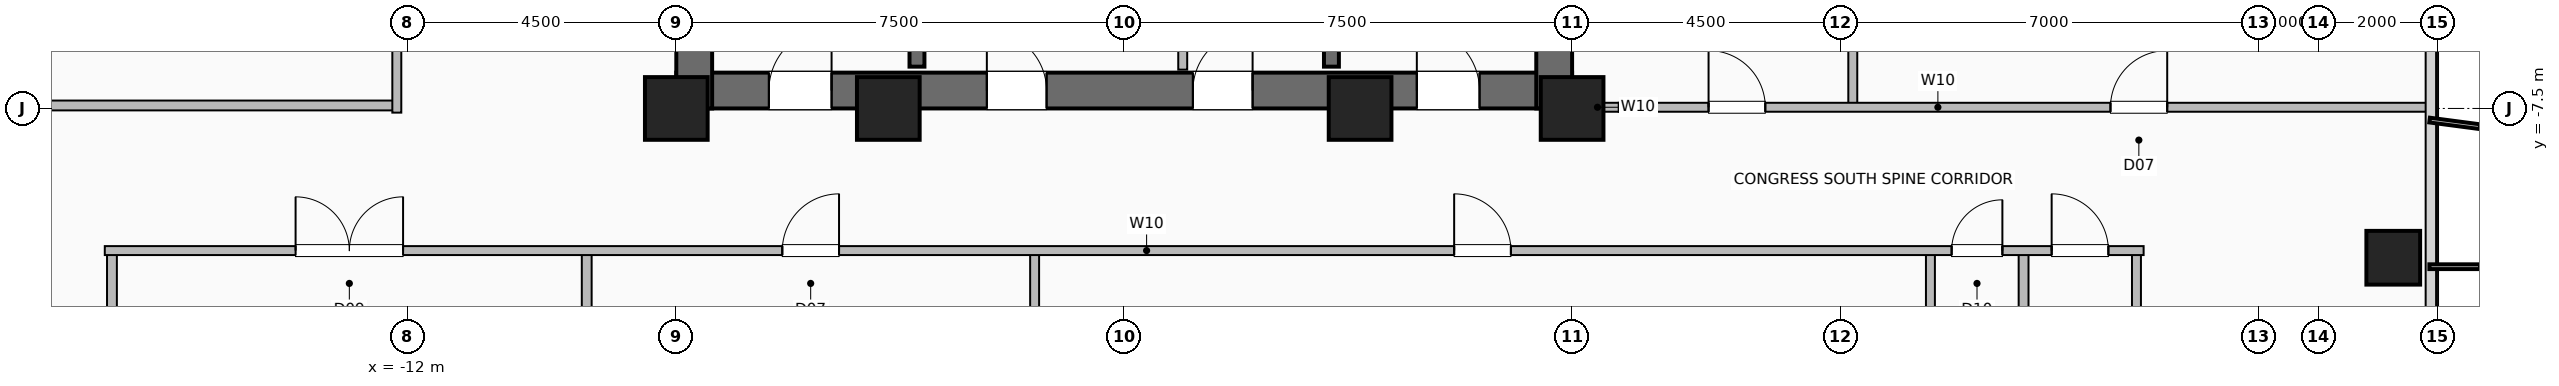
"""IFC4 building model, lengths in metres.
Left out: names, types, materials, properties, quantities, classifications, styles, units other than length and angle.
Written with IfcOpenShell. Run it as: python <this file> out.ifc"""

import sys

from ifc_helpers import new_model, si_unit, direction, frame, frame_2d, origin, origin_2d, place, context, subcontext, project, spatial, rectangle, hollow_rectangle, extrude, element, fill, save


model = new_model("IFC4")
c1 = context("Model", 3, precision=1e-05, world=origin(), true_north=direction((0.0, 1.0)))
c2 = subcontext(c1, "Body", "Model", "MODEL_VIEW")
j1 = project(units=[si_unit("LENGTHUNIT", "METRE"), si_unit("PLANEANGLEUNIT", "RADIAN")], contexts=[c1])
p1 = place(None, origin())
s1 = spatial("IfcSite", under=j1, at=p1, CompositionType="ELEMENT")
p2 = place(p1, origin())
s2 = spatial("IfcBuilding", under=s1, at=p2, CompositionType="ELEMENT")
p3 = place(p2, frame((0.0, 0.0, 104.8)))
s3 = spatial("IfcBuildingStorey", under=s2, at=p3, CompositionType="ELEMENT", Elevation=104.8)
for number, where, z_axis, x_axis in (
    (1, (-7.5, -7.5, 0.0), (0.0, 0.0, 1.0), (1.0, 0.0, 0.0)),
    (2, (-3.95, -7.5, 0.0), (0.0, 0.0, 1.0), (1.0, 0.0, 0.0)),
    (3, (3.95, -7.5, 0.0), (0.0, 0.0, 1.0), (1.0, 0.0, 0.0)),
    (4, (7.5, -7.5, 0.0), (0.0, 0.0, 1.0), (1.0, 0.0, 0.0)),
):
    element("IfcColumn", number, at=place(p3, frame(where, z_axis=z_axis, x_axis=x_axis)), inside=s3, PredefinedType="COLUMN", context=c2, shape_type="SweptSolid", body=[
        extrude(hollow_rectangle(XDim=1.05, YDim=1.05, WallThickness=0.05, at=origin_2d()), origin(), (0.0, 0.0, 1.0), 3.6),
    ])
p4 = place(p3, frame((21.25, -10.0, 0.0), z_axis=(0.0, 0.0, 1.0), x_axis=(1.0, 0.0, 0.0)))
e5 = element("IfcColumn", 5, at=p4, inside=s3, PredefinedType="COLUMN", context=c2, shape_type="SweptSolid", body=[
    extrude(hollow_rectangle(XDim=0.9, YDim=0.9, WallThickness=0.045, at=origin_2d()), origin(), (0.0, 0.0, 1.0), 3.6),
])
p5 = place(p3, frame((-7.5, -7.2, 0.0), z_axis=(0.0, 0.0, 1.0), x_axis=(1.0, 0.0, 0.0)))
e6 = element("IfcWall", 6, at=p5, inside=s3, PredefinedType="SHEAR", context=c2, shape_type="SweptSolid", body=[
    extrude(rectangle(XDim=15.0, YDim=0.6, at=frame_2d((7.5, 0.0))), origin(), (0.0, 0.0, 1.0), 3.36),
])
p6 = place(p5, frame((1.55, 0.0, 0.0)))
e7 = element("IfcOpeningElement", 7, at=p6, cuts=e6, PredefinedType="OPENING", context=c2, shape_type="SweptSolid", body=[
    extrude(rectangle(XDim=1.05, YDim=2.08, at=frame_2d((0.525, 1.04))), frame((0.0, 0.31, 0.0), z_axis=(0.0, -1.0, 0.0), x_axis=(1.0, 0.0, 0.0)), (0.0, 0.0, 1.0), 0.62),
])
p7 = place(p5, frame((12.4, 0.0, 0.0)))
e8 = element("IfcOpeningElement", 8, at=p7, cuts=e6, PredefinedType="OPENING", context=c2, shape_type="SweptSolid", body=[
    extrude(rectangle(XDim=1.05, YDim=2.08, at=frame_2d((0.525, 1.04))), frame((0.0, 0.31, 0.0), z_axis=(0.0, -1.0, 0.0), x_axis=(1.0, 0.0, 0.0)), (0.0, 0.0, 1.0), 0.62),
])
p8 = place(p5, frame((5.2, 0.0, 0.0)))
e9 = element("IfcOpeningElement", 9, at=p8, cuts=e6, PredefinedType="OPENING", context=c2, shape_type="SweptSolid", body=[
    extrude(rectangle(XDim=1.0, YDim=2.08, at=frame_2d((0.5, 1.04))), frame((0.0, 0.31, 0.0), z_axis=(0.0, -1.0, 0.0), x_axis=(1.0, 0.0, 0.0)), (0.0, 0.0, 1.0), 0.62),
])
p9 = place(p5, frame((8.65, 0.0, 0.0)))
e10 = element("IfcOpeningElement", 10, at=p9, cuts=e6, PredefinedType="OPENING", context=c2, shape_type="SweptSolid", body=[
    extrude(rectangle(XDim=1.0, YDim=2.08, at=frame_2d((0.5, 1.04))), frame((0.0, 0.31, 0.0), z_axis=(0.0, -1.0, 0.0), x_axis=(1.0, 0.0, 0.0)), (0.0, 0.0, 1.0), 0.62),
])
p10 = place(p3, frame((-7.2, -7.5, 0.0), z_axis=(0.0, 0.0, 1.0), x_axis=(0.0, 1.0, 0.0)))
e11 = element("IfcWall", 11, at=p10, inside=s3, PredefinedType="SHEAR", context=c2, shape_type="SweptSolid", body=[
    extrude(rectangle(XDim=15.0, YDim=0.6, at=frame_2d((7.5, 0.0))), origin(), (0.0, 0.0, 1.0), 3.36),
])
p11 = place(p10, frame((9.5, 0.0, 0.0)))
e12 = element("IfcOpeningElement", 12, at=p11, cuts=e11, PredefinedType="OPENING", context=c2, shape_type="SweptSolid", body=[
    extrude(rectangle(XDim=1.0, YDim=2.08, at=frame_2d((0.5, 1.04))), frame((0.0, 0.31, 0.0), z_axis=(0.0, -1.0, 0.0), x_axis=(1.0, 0.0, 0.0)), (0.0, 0.0, 1.0), 0.62),
])
p12 = place(p3, frame((7.2, -7.5, 0.0), z_axis=(0.0, 0.0, 1.0), x_axis=(0.0, 1.0, 0.0)))
e13 = element("IfcWall", 13, at=p12, inside=s3, PredefinedType="SHEAR", context=c2, shape_type="SweptSolid", body=[
    extrude(rectangle(XDim=15.0, YDim=0.6, at=frame_2d((7.5, 0.0))), origin(), (0.0, 0.0, 1.0), 3.36),
])
for number, where, z_axis, x_axis in (
    (14, (-3.47, -6.8, 0.0), (0.0, 0.0, 1.0), (0.0, 1.0, 0.0)),
    (15, (3.47, -6.8, 0.0), (0.0, 0.0, 1.0), (0.0, 1.0, 0.0)),
):
    element("IfcWall", number, at=place(p3, frame(where, z_axis=z_axis, x_axis=x_axis)), inside=s3, PredefinedType="SHEAR", context=c2, shape_type="SweptSolid", body=[
        extrude(rectangle(XDim=7.72, YDim=0.25, at=frame_2d((3.86, 0.0))), origin(), (0.0, 0.0, 1.0), 3.36),
    ])
p13 = place(p3, frame((0.98, -6.85, 0.0), z_axis=(0.0, 0.0, 1.0), x_axis=(0.0, 1.0, 0.0)))
e16 = element("IfcWall", 16, at=p13, inside=s3, PredefinedType="PARTITIONING", context=c2, shape_type="SweptSolid", body=[
    extrude(rectangle(XDim=4.42, YDim=0.15, at=frame_2d((2.21, 0.0))), origin(), (0.0, 0.0, 1.0), 3.36),
])
for number, where, z_axis, x_axis in (
    (17, (15.06, -21.82, 0.0), (0.0, 0.0, 1.0), (0.0, 1.0, 0.0)),
    (18, (-16.95, -21.82, 0.0), (0.0, 0.0, 1.0), (0.0, 1.0, 0.0)),
    (19, (-9.0, -21.82, 0.0), (0.0, 0.0, 1.0), (0.0, 1.0, 0.0)),
):
    element("IfcWall", number, at=place(p3, frame(where, z_axis=z_axis, x_axis=x_axis)), inside=s3, PredefinedType="PLUMBINGWALL", context=c2, shape_type="SweptSolid", body=[
        extrude(rectangle(XDim=11.94, YDim=0.165, at=frame_2d((5.97, 0.0))), origin(), (0.0, 0.0, 1.0), 3.36),
    ])
for number, where, z_axis, x_axis in (
    (20, (-1.5, -21.82, 0.0), (0.0, 0.0, 1.0), (0.0, 1.0, 0.0)),
    (21, (13.5, -21.82, 0.0), (0.0, 0.0, 1.0), (0.0, 1.0, 0.0)),
    (22, (16.95, -21.82, 0.0), (0.0, 0.0, 1.0), (0.0, 1.0, 0.0)),
):
    element("IfcWall", number, at=place(p3, frame(where, z_axis=z_axis, x_axis=x_axis)), inside=s3, PredefinedType="PARTITIONING", context=c2, shape_type="SweptSolid", body=[
        extrude(rectangle(XDim=11.94, YDim=0.15, at=frame_2d((5.97, 0.0))), origin(), (0.0, 0.0, 1.0), 3.36),
    ])
p14 = place(p3, frame((-17.07, -9.88, 0.0), z_axis=(0.0, 0.0, 1.0), x_axis=(1.0, 0.0, 0.0)))
e23 = element("IfcWall", 23, at=p14, inside=s3, PredefinedType="PARTITIONING", context=c2, shape_type="SweptSolid", body=[
    extrude(rectangle(XDim=34.14, YDim=0.15, at=frame_2d((17.07, 0.0))), origin(), (0.0, 0.0, 1.0), 3.36),
])
p15 = place(p14, frame((3.195, 0.0, 0.0)))
e24 = element("IfcOpeningElement", 24, at=p15, cuts=e23, PredefinedType="OPENING", context=c2, shape_type="SweptSolid", body=[
    extrude(rectangle(XDim=1.8, YDim=2.08, at=frame_2d((0.9, 1.04))), frame((0.0, 0.085, 0.0), z_axis=(0.0, -1.0, 0.0), x_axis=(1.0, 0.0, 0.0)), (0.0, 0.0, 1.0), 0.17),
])
p16 = place(p14, frame((11.345, 0.0, 0.0)))
e25 = element("IfcOpeningElement", 25, at=p16, cuts=e23, PredefinedType="OPENING", context=c2, shape_type="SweptSolid", body=[
    extrude(rectangle(XDim=0.95, YDim=2.06, at=frame_2d((0.475, 1.03))), frame((0.0, 0.085, 0.0), z_axis=(0.0, -1.0, 0.0), x_axis=(1.0, 0.0, 0.0)), (0.0, 0.0, 1.0), 0.17),
])
p17 = place(p14, frame((22.595, 0.0, 0.0)))
e26 = element("IfcOpeningElement", 26, at=p17, cuts=e23, PredefinedType="OPENING", context=c2, shape_type="SweptSolid", body=[
    extrude(rectangle(XDim=0.95, YDim=2.06, at=frame_2d((0.475, 1.03))), frame((0.0, 0.085, 0.0), z_axis=(0.0, -1.0, 0.0), x_axis=(1.0, 0.0, 0.0)), (0.0, 0.0, 1.0), 0.17),
])
p18 = place(p14, frame((30.925, 0.0, 0.0)))
e27 = element("IfcOpeningElement", 27, at=p18, cuts=e23, PredefinedType="OPENING", context=c2, shape_type="SweptSolid", body=[
    extrude(rectangle(XDim=0.85, YDim=2.05, at=frame_2d((0.425, 1.025))), frame((0.0, 0.085, 0.0), z_axis=(0.0, -1.0, 0.0), x_axis=(1.0, 0.0, 0.0)), (0.0, 0.0, 1.0), 0.17),
])
p19 = place(p14, frame((32.6, 0.0, 0.0)))
e28 = element("IfcOpeningElement", 28, at=p19, cuts=e23, PredefinedType="OPENING", context=c2, shape_type="SweptSolid", body=[
    extrude(rectangle(XDim=0.95, YDim=2.06, at=frame_2d((0.475, 1.03))), frame((0.0, 0.085, 0.0), z_axis=(0.0, -1.0, 0.0), x_axis=(1.0, 0.0, 0.0)), (0.0, 0.0, 1.0), 0.17),
])
p20 = place(p3, frame((-21.82, -7.45, 0.0), z_axis=(0.0, 0.0, 1.0), x_axis=(1.0, 0.0, 0.0)))
e29 = element("IfcWall", 29, at=p20, inside=s3, PredefinedType="PLUMBINGWALL", context=c2, shape_type="SweptSolid", body=[
    extrude(rectangle(XDim=9.64, YDim=0.165, at=frame_2d((4.82, 0.0))), origin(), (0.0, 0.0, 1.0), 3.36),
])
p21 = place(p3, frame((-12.18, -7.57, 0.0), z_axis=(0.0, 0.0, 1.0), x_axis=(0.0, 1.0, 0.0)))
e30 = element("IfcWall", 30, at=p21, inside=s3, PredefinedType="PARTITIONING", context=c2, shape_type="SweptSolid", body=[
    extrude(rectangle(XDim=15.14, YDim=0.15, at=frame_2d((7.57, 0.0))), origin(), (0.0, 0.0, 1.0), 3.36),
])
p22 = place(p21, frame((2.62, 0.0, 0.0)))
e31 = element("IfcOpeningElement", 31, at=p22, cuts=e30, PredefinedType="OPENING", context=c2, shape_type="SweptSolid", body=[
    extrude(rectangle(XDim=0.95, YDim=2.06, at=frame_2d((0.475, 1.03))), frame((0.0, 0.085, 0.0), z_axis=(0.0, -1.0, 0.0), x_axis=(1.0, 0.0, 0.0)), (0.0, 0.0, 1.0), 0.17),
])
p23 = place(p21, frame((8.845, 0.0, 0.0)))
e32 = element("IfcOpeningElement", 32, at=p23, cuts=e30, PredefinedType="OPENING", context=c2, shape_type="SweptSolid", body=[
    extrude(rectangle(XDim=0.95, YDim=2.06, at=frame_2d((0.475, 1.03))), frame((0.0, 0.085, 0.0), z_axis=(0.0, -1.0, 0.0), x_axis=(1.0, 0.0, 0.0)), (0.0, 0.0, 1.0), 0.17),
])
p24 = place(p21, frame((13.37, 0.0, 0.0)))
e33 = element("IfcOpeningElement", 33, at=p24, cuts=e30, PredefinedType="OPENING", context=c2, shape_type="SweptSolid", body=[
    extrude(rectangle(XDim=0.85, YDim=2.05, at=frame_2d((0.425, 1.025))), frame((0.0, 0.085, 0.0), z_axis=(0.0, -1.0, 0.0), x_axis=(1.0, 0.0, 0.0)), (0.0, 0.0, 1.0), 0.17),
])
p25 = place(p3, frame((7.45, -7.48, 0.0), z_axis=(0.0, 0.0, 1.0), x_axis=(1.0, 0.0, 0.0)))
e34 = element("IfcWall", 34, at=p25, inside=s3, PredefinedType="PARTITIONING", context=c2, shape_type="SweptSolid", body=[
    extrude(rectangle(XDim=0.95, YDim=0.15, at=frame_2d((0.475, 0.0))), origin(), (0.0, 0.0, 1.0), 3.36),
])
p26 = place(p3, frame((12.2, -7.48, 0.0), z_axis=(0.0, 0.0, 1.0), x_axis=(0.0, 1.0, 0.0)))
e35 = element("IfcWall", 35, at=p26, inside=s3, PredefinedType="PARTITIONING", context=c2, shape_type="SweptSolid", body=[
    extrude(rectangle(XDim=14.88, YDim=0.15, at=frame_2d((7.44, 0.0))), origin(), (0.0, 0.0, 1.0), 3.36),
])
p27 = place(p3, frame((8.28, -7.48, 0.0), z_axis=(0.0, 0.0, 1.0), x_axis=(1.0, 0.0, 0.0)))
e36 = element("IfcWall", 36, at=p27, inside=s3, PredefinedType="PARTITIONING", context=c2, shape_type="SweptSolid", body=[
    extrude(rectangle(XDim=13.54, YDim=0.15, at=frame_2d((6.77, 0.0))), origin(), (0.0, 0.0, 1.0), 3.36),
])
p28 = place(p27, frame((1.505, 0.0, 0.0)))
e37 = element("IfcOpeningElement", 37, at=p28, cuts=e36, PredefinedType="OPENING", context=c2, shape_type="SweptSolid", body=[
    extrude(rectangle(XDim=0.95, YDim=2.06, at=frame_2d((0.475, 1.03))), frame((0.0, 0.085, 0.0), z_axis=(0.0, -1.0, 0.0), x_axis=(1.0, 0.0, 0.0)), (0.0, 0.0, 1.0), 0.17),
])
p29 = place(p27, frame((8.235, 0.0, 0.0)))
e38 = element("IfcOpeningElement", 38, at=p29, cuts=e36, PredefinedType="OPENING", context=c2, shape_type="SweptSolid", body=[
    extrude(rectangle(XDim=0.95, YDim=2.06, at=frame_2d((0.475, 1.03))), frame((0.0, 0.085, 0.0), z_axis=(0.0, -1.0, 0.0), x_axis=(1.0, 0.0, 0.0)), (0.0, 0.0, 1.0), 0.17),
])
p30 = place(p6, origin())
e39 = element("IfcDoor", 39, at=p30, inside=s3, OperationType="SINGLE_SWING_RIGHT", PredefinedType="DOOR", context=c2, shape_type="SweptSolid", body=[
    extrude(rectangle(XDim=1.05, YDim=2.08, at=frame_2d((0.525, 1.04))), frame((0.0, 0.025, 0.0), z_axis=(0.0, -1.0, 0.0), x_axis=(1.0, 0.0, 0.0)), (0.0, 0.0, 1.0), 0.05),
])
fill(e7, e39)
p31 = place(p7, origin())
e40 = element("IfcDoor", 40, at=p31, inside=s3, OperationType="SINGLE_SWING_LEFT", PredefinedType="DOOR", context=c2, shape_type="SweptSolid", body=[
    extrude(rectangle(XDim=1.05, YDim=2.08, at=frame_2d((0.525, 1.04))), frame((0.0, 0.025, 0.0), z_axis=(0.0, -1.0, 0.0), x_axis=(1.0, 0.0, 0.0)), (0.0, 0.0, 1.0), 0.05),
])
fill(e8, e40)
p32 = place(p8, origin())
e41 = element("IfcDoor", 41, at=p32, inside=s3, OperationType="SINGLE_SWING_LEFT", PredefinedType="DOOR", context=c2, shape_type="SweptSolid", body=[
    extrude(rectangle(XDim=1.0, YDim=2.08, at=frame_2d((0.5, 1.04))), frame((0.0, 0.025, 0.0), z_axis=(0.0, -1.0, 0.0), x_axis=(1.0, 0.0, 0.0)), (0.0, 0.0, 1.0), 0.05),
])
fill(e9, e41)
p33 = place(p9, origin())
e42 = element("IfcDoor", 42, at=p33, inside=s3, OperationType="SINGLE_SWING_RIGHT", PredefinedType="DOOR", context=c2, shape_type="SweptSolid", body=[
    extrude(rectangle(XDim=1.0, YDim=2.08, at=frame_2d((0.5, 1.04))), frame((0.0, 0.025, 0.0), z_axis=(0.0, -1.0, 0.0), x_axis=(1.0, 0.0, 0.0)), (0.0, 0.0, 1.0), 0.05),
])
fill(e10, e42)
p34 = place(p15, origin())
e43 = element("IfcDoor", 43, at=p34, inside=s3, OperationType="DOUBLE_DOOR_SINGLE_SWING", PredefinedType="DOOR", context=c2, shape_type="SweptSolid", body=[
    extrude(rectangle(XDim=1.8, YDim=2.08, at=frame_2d((0.9, 1.04))), frame((0.0, 0.025, 0.0), z_axis=(0.0, -1.0, 0.0), x_axis=(1.0, 0.0, 0.0)), (0.0, 0.0, 1.0), 0.05),
])
fill(e24, e43)
p35 = place(p16, origin())
e44 = element("IfcDoor", 44, at=p35, inside=s3, OperationType="SINGLE_SWING_RIGHT", PredefinedType="DOOR", context=c2, shape_type="SweptSolid", body=[
    extrude(rectangle(XDim=0.95, YDim=2.06, at=frame_2d((0.475, 1.03))), frame((0.0, 0.025, 0.0), z_axis=(0.0, -1.0, 0.0), x_axis=(1.0, 0.0, 0.0)), (0.0, 0.0, 1.0), 0.05),
])
fill(e25, e44)
p36 = place(p17, origin())
e45 = element("IfcDoor", 45, at=p36, inside=s3, OperationType="SINGLE_SWING_LEFT", PredefinedType="DOOR", context=c2, shape_type="SweptSolid", body=[
    extrude(rectangle(XDim=0.95, YDim=2.06, at=frame_2d((0.475, 1.03))), frame((0.0, 0.025, 0.0), z_axis=(0.0, -1.0, 0.0), x_axis=(1.0, 0.0, 0.0)), (0.0, 0.0, 1.0), 0.05),
])
fill(e26, e45)
p37 = place(p18, origin())
e46 = element("IfcDoor", 46, at=p37, inside=s3, OperationType="SINGLE_SWING_RIGHT", PredefinedType="DOOR", context=c2, shape_type="SweptSolid", body=[
    extrude(rectangle(XDim=0.85, YDim=2.05, at=frame_2d((0.425, 1.025))), frame((0.0, 0.025, 0.0), z_axis=(0.0, -1.0, 0.0), x_axis=(1.0, 0.0, 0.0)), (0.0, 0.0, 1.0), 0.05),
])
fill(e27, e46)
p38 = place(p19, origin())
e47 = element("IfcDoor", 47, at=p38, inside=s3, OperationType="SINGLE_SWING_LEFT", PredefinedType="DOOR", context=c2, shape_type="SweptSolid", body=[
    extrude(rectangle(XDim=0.95, YDim=2.06, at=frame_2d((0.475, 1.03))), frame((0.0, 0.025, 0.0), z_axis=(0.0, -1.0, 0.0), x_axis=(1.0, 0.0, 0.0)), (0.0, 0.0, 1.0), 0.05),
])
fill(e28, e47)
p39 = place(p28, origin())
e48 = element("IfcDoor", 48, at=p39, inside=s3, OperationType="SINGLE_SWING_LEFT", PredefinedType="DOOR", context=c2, shape_type="SweptSolid", body=[
    extrude(rectangle(XDim=0.95, YDim=2.06, at=frame_2d((0.475, 1.03))), frame((0.0, 0.025, 0.0), z_axis=(0.0, -1.0, 0.0), x_axis=(1.0, 0.0, 0.0)), (0.0, 0.0, 1.0), 0.05),
])
fill(e37, e48)
p40 = place(p29, origin())
e49 = element("IfcDoor", 49, at=p40, inside=s3, OperationType="SINGLE_SWING_RIGHT", PredefinedType="DOOR", context=c2, shape_type="SweptSolid", body=[
    extrude(rectangle(XDim=0.95, YDim=2.06, at=frame_2d((0.475, 1.03))), frame((0.0, 0.025, 0.0), z_axis=(0.0, -1.0, 0.0), x_axis=(1.0, 0.0, 0.0)), (0.0, 0.0, 1.0), 0.05),
])
fill(e38, e49)
save(model, sys.argv[1])
